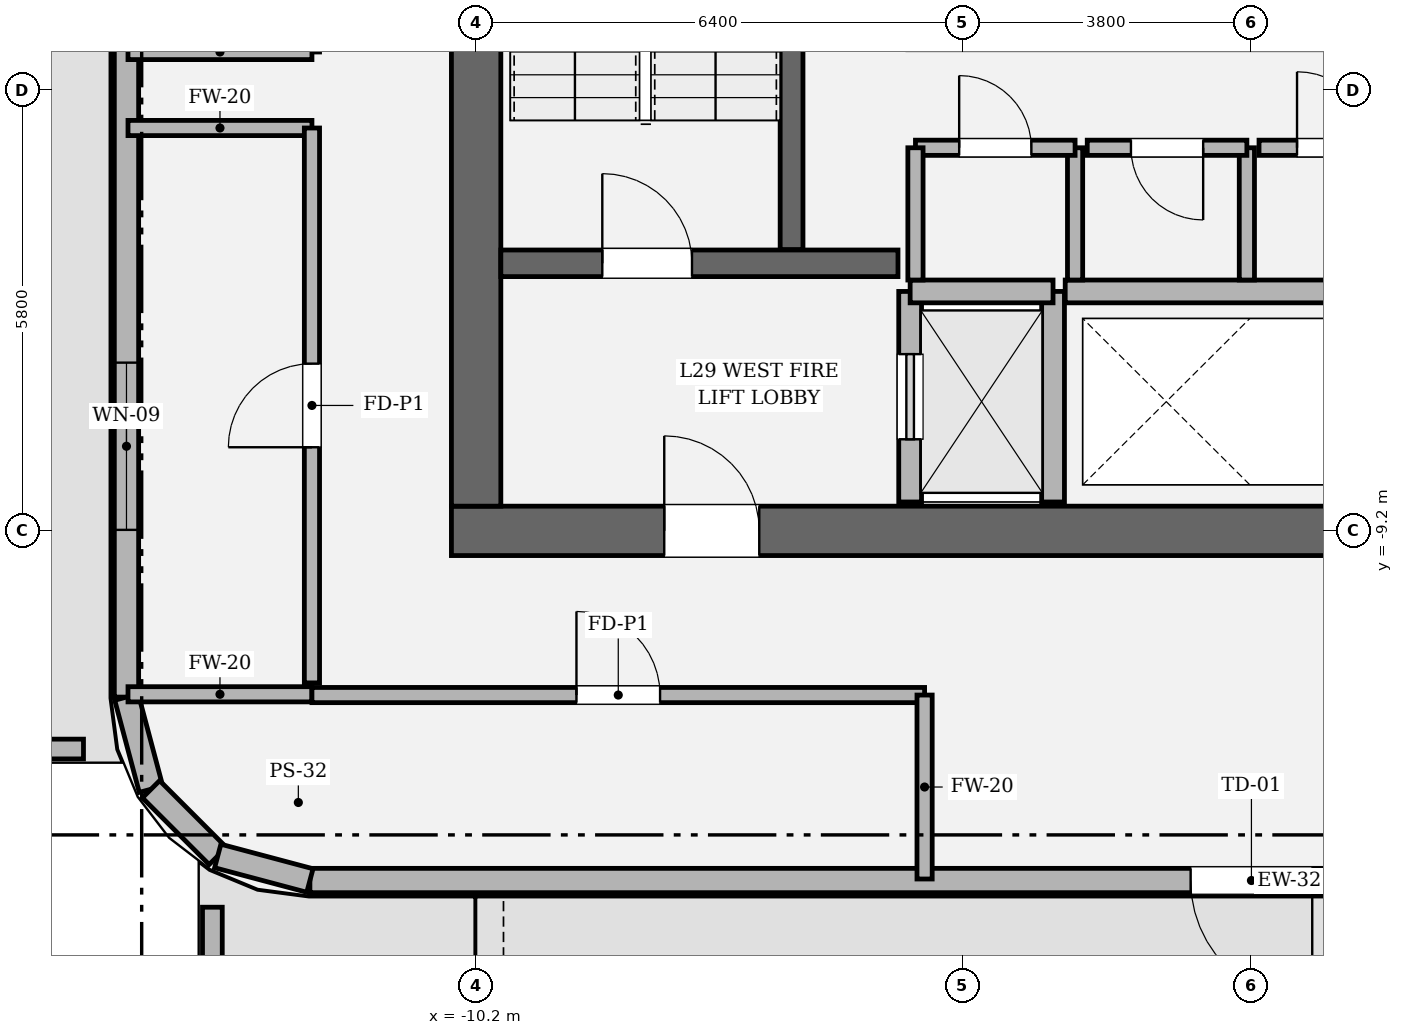
"""IFC4 building model, lengths in metres.
Left out: names, types, materials, properties, quantities, classifications, styles, units other than length and angle.
Written with IfcOpenShell. Run it as: python <this file> out.ifc"""

import sys

from ifc_helpers import new_model, si_unit, direction, frame, frame_2d, origin, place, context, subcontext, project, spatial, rectangle, extrude, element, fill, save


model = new_model("IFC4")
c1 = context("Model", 3, precision=1e-05, world=origin(), true_north=direction((0.0, 1.0)))
c2 = subcontext(c1, "Body", "Model", "MODEL_VIEW")
j1 = project(units=[si_unit("LENGTHUNIT", "METRE"), si_unit("PLANEANGLEUNIT", "RADIAN")], contexts=[c1])
p1 = place(None, origin())
s1 = spatial("IfcSite", under=j1, at=p1, CompositionType="ELEMENT")
p2 = place(p1, origin())
s2 = spatial("IfcBuilding", under=s1, at=p2, CompositionType="ELEMENT")
p3 = place(p2, frame((0.0, 0.0, 125.4)))
s3 = spatial("IfcBuildingStorey", under=s2, at=p3, CompositionType="ELEMENT", Elevation=125.4)
p4 = place(p3, frame((10.525, -9.2, 0.0), z_axis=(0.0, 0.0, 1.0), x_axis=(-1.0, 0.0, 0.0)))
e1 = element("IfcWall", 1, at=p4, inside=s3, PredefinedType="SHEAR", context=c2, shape_type="SweptSolid", body=[
    extrude(rectangle(XDim=21.05, YDim=0.65, at=frame_2d((10.525, 0.0))), origin(), (0.0, 0.0, 1.0), 4.8),
])
p5 = place(p4, frame((2.8, 0.0, 0.0)))
e2 = element("IfcOpeningElement", 2, at=p5, cuts=e1, PredefinedType="OPENING", context=c2, shape_type="SweptSolid", body=[
    extrude(rectangle(XDim=1.25, YDim=2.25, at=frame_2d((0.625, 1.125))), frame((0.0, 0.335, 0.0), z_axis=(0.0, -1.0, 0.0), x_axis=(1.0, 0.0, 0.0)), (0.0, 0.0, 1.0), 0.67),
])
p6 = place(p4, frame((17.0, 0.0, 0.0)))
e3 = element("IfcOpeningElement", 3, at=p6, cuts=e1, PredefinedType="OPENING", context=c2, shape_type="SweptSolid", body=[
    extrude(rectangle(XDim=1.25, YDim=2.25, at=frame_2d((0.625, 1.125))), frame((0.0, 0.335, 0.0), z_axis=(0.0, -1.0, 0.0), x_axis=(1.0, 0.0, 0.0)), (0.0, 0.0, 1.0), 0.67),
])
p7 = place(p3, frame((-10.2, -8.875, 0.0), z_axis=(0.0, 0.0, 1.0), x_axis=(0.0, 1.0, 0.0)))
e4 = element("IfcWall", 4, at=p7, inside=s3, PredefinedType="SHEAR", context=c2, shape_type="SweptSolid", body=[
    extrude(rectangle(XDim=17.75, YDim=0.65, at=frame_2d((8.875, 0.0))), origin(), (0.0, 0.0, 1.0), 4.8),
])
p8 = place(p7, frame((12.665, 0.0, 0.0)))
e5 = element("IfcOpeningElement", 5, at=p8, cuts=e4, PredefinedType="OPENING", context=c2, shape_type="SweptSolid", body=[
    extrude(rectangle(XDim=1.18, YDim=2.2, at=frame_2d((0.59, 1.1))), frame((0.0, 0.335, 0.0), z_axis=(0.0, -1.0, 0.0), x_axis=(1.0, 0.0, 0.0)), (0.0, 0.0, 1.0), 0.67),
])
p9 = place(p3, frame((-6.05, -5.5, 0.0), z_axis=(0.0, 0.0, 1.0), x_axis=(0.0, 1.0, 0.0)))
e6 = element("IfcWall", 6, at=p9, inside=s3, PredefinedType="SOLIDWALL", context=c2, shape_type="SweptSolid", body=[
    extrude(rectangle(XDim=8.95, YDim=0.3, at=frame_2d((4.475, 0.0))), origin(), (0.0, 0.0, 1.0), 4.8),
])
p10 = place(p3, frame((-9.875, -5.68, 0.0), z_axis=(0.0, 0.0, 1.0), x_axis=(1.0, 0.0, 0.0)))
e7 = element("IfcWall", 7, at=p10, inside=s3, PredefinedType="SOLIDWALL", context=c2, shape_type="SweptSolid", body=[
    extrude(rectangle(XDim=5.225, YDim=0.35, at=frame_2d((2.613, 0.0))), origin(), (0.0, 0.0, 1.0), 4.8),
])
p11 = place(p10, frame((1.335, 0.0, 0.0)))
e8 = element("IfcOpeningElement", 8, at=p11, cuts=e7, PredefinedType="OPENING", context=c2, shape_type="SweptSolid", body=[
    extrude(rectangle(XDim=1.18, YDim=2.2, at=frame_2d((0.59, 1.1))), frame((0.0, 0.185, 0.0), z_axis=(0.0, -1.0, 0.0), x_axis=(1.0, 0.0, 0.0)), (0.0, 0.0, 1.0), 0.37),
])
p12 = place(p3, frame((-12.387, -13.8, 0.0), z_axis=(0.0, 0.0, 1.0), x_axis=(1.0, 0.0, 0.0)))
e9 = element("IfcWall", 9, at=p12, inside=s3, PredefinedType="SOLIDWALL", context=c2, shape_type="SweptSolid", body=[
    extrude(rectangle(XDim=24.774, YDim=0.32, at=frame_2d((12.387, 0.0))), origin(), (0.0, 0.0, 1.0), 3.194),
])
p13 = place(p12, frame((11.587, 0.0, 0.0)))
e10 = element("IfcOpeningElement", 10, at=p13, cuts=e9, PredefinedType="OPENING", context=c2, shape_type="SweptSolid", body=[
    extrude(rectangle(XDim=1.6, YDim=2.35, at=frame_2d((0.8, 1.175))), frame((0.0, 0.17, 0.0), z_axis=(0.0, -1.0, 0.0), x_axis=(1.0, 0.0, 0.0)), (0.0, 0.0, 1.0), 0.34),
])
p14 = place(p3, frame((-14.8, 11.387, 0.0), z_axis=(0.0, 0.0, 1.0), x_axis=(0.0, -1.0, 0.0)))
e11 = element("IfcWall", 11, at=p14, inside=s3, PredefinedType="SOLIDWALL", context=c2, shape_type="SweptSolid", body=[
    extrude(rectangle(XDim=22.774, YDim=0.32, at=frame_2d((11.387, 0.0))), origin(), (0.0, 0.0, 1.0), 3.194),
])
p15 = place(p14, frame((2.2, 0.0, 0.9)))
e12 = element("IfcOpeningElement", 12, at=p15, cuts=e11, PredefinedType="OPENING", context=c2, shape_type="SweptSolid", body=[
    extrude(rectangle(XDim=2.2, YDim=1.2, at=frame_2d((1.1, 0.6))), frame((0.0, 0.17, 0.0), z_axis=(0.0, -1.0, 0.0), x_axis=(1.0, 0.0, 0.0)), (0.0, 0.0, 1.0), 0.34),
])
p16 = place(p14, frame((18.374, 0.0, 0.9)))
e13 = element("IfcOpeningElement", 13, at=p16, cuts=e11, PredefinedType="OPENING", context=c2, shape_type="SweptSolid", body=[
    extrude(rectangle(XDim=2.2, YDim=1.2, at=frame_2d((1.1, 0.6))), frame((0.0, 0.17, 0.0), z_axis=(0.0, -1.0, 0.0), x_axis=(1.0, 0.0, 0.0)), (0.0, 0.0, 1.0), 0.34),
])
p17 = place(p3, frame((-14.8, -11.387, 0.0), z_axis=(0.0, 0.0, 1.0), x_axis=(0.25748094776, -0.966283375382, 0.0)))
e14 = element("IfcWall", 14, at=p17, inside=s3, PredefinedType="SOLIDWALL", context=c2, shape_type="SweptSolid", body=[
    extrude(rectangle(XDim=1.254, YDim=0.32, at=frame_2d((0.627, 0.0))), origin(), (0.0, 0.0, 1.0), 3.194),
])
p18 = place(p3, frame((-14.477, -12.599, 0.0), z_axis=(0.0, 0.0, 1.0), x_axis=(0.707106781187, -0.707106781187, 0.0)))
e15 = element("IfcWall", 15, at=p18, inside=s3, PredefinedType="SOLIDWALL", context=c2, shape_type="SweptSolid", body=[
    extrude(rectangle(XDim=1.242, YDim=0.32, at=frame_2d((0.621, 0.0))), origin(), (0.0, 0.0, 1.0), 3.194),
])
p19 = place(p3, frame((-13.599, -13.477, 0.0), z_axis=(0.0, 0.0, 1.0), x_axis=(0.966283375382, -0.25748094776, 0.0)))
e16 = element("IfcWall", 16, at=p19, inside=s3, PredefinedType="SOLIDWALL", context=c2, shape_type="SweptSolid", body=[
    extrude(rectangle(XDim=1.254, YDim=0.32, at=frame_2d((0.627, 0.0))), origin(), (0.0, 0.0, 1.0), 3.194),
])
p20 = place(p3, frame((-20.07, -12.07, 0.0), z_axis=(0.0, 0.0, 1.0), x_axis=(1.0, 0.0, 0.0)))
e17 = element("IfcWall", 17, at=p20, inside=s3, PredefinedType="PARAPET", context=c2, shape_type="SweptSolid", body=[
    extrude(rectangle(XDim=4.704, YDim=0.26, at=frame_2d((2.352, 0.0))), origin(), (0.0, 0.0, 1.0), 1.2),
])
p21 = place(p3, frame((-13.67, -14.151, 0.0), z_axis=(0.0, 0.0, 1.0), x_axis=(0.0, -1.0, 0.0)))
e18 = element("IfcWall", 18, at=p21, inside=s3, PredefinedType="PARAPET", context=c2, shape_type="SweptSolid", body=[
    extrude(rectangle(XDim=4.319, YDim=0.26, at=frame_2d((2.159, 0.0))), origin(), (0.0, 0.0, 1.0), 1.2),
])
p22 = place(p3, frame((-4.49, -8.82, 0.0), z_axis=(0.0, 0.0, 1.0), x_axis=(0.0, 1.0, 0.0)))
e19 = element("IfcWall", 19, at=p22, inside=s3, PredefinedType="SOLIDWALL", context=c2, shape_type="SweptSolid", body=[
    extrude(rectangle(XDim=2.77, YDim=0.3, at=frame_2d((1.385, 0.0))), origin(), (0.0, 0.0, 1.0), 4.48),
])
p23 = place(p22, frame((0.825, 0.0, 0.0)))
e20 = element("IfcOpeningElement", 20, at=p23, cuts=e19, PredefinedType="OPENING", context=c2, shape_type="SweptSolid", body=[
    extrude(rectangle(XDim=1.12, YDim=2.25, at=frame_2d((0.56, 1.125))), frame((0.0, 0.16, 0.0), z_axis=(0.0, -1.0, 0.0), x_axis=(1.0, 0.0, 0.0)), (0.0, 0.0, 1.0), 0.32),
])
p24 = place(p3, frame((-2.61, -8.82, 0.0), z_axis=(0.0, 0.0, 1.0), x_axis=(0.0, 1.0, 0.0)))
e21 = element("IfcWall", 21, at=p24, inside=s3, PredefinedType="SOLIDWALL", context=c2, shape_type="SweptSolid", body=[
    extrude(rectangle(XDim=2.77, YDim=0.3, at=frame_2d((1.385, 0.0))), origin(), (0.0, 0.0, 1.0), 4.48),
])
p25 = place(p3, frame((-4.49, -6.05, 0.0), z_axis=(0.0, 0.0, 1.0), x_axis=(1.0, 0.0, 0.0)))
e22 = element("IfcWall", 22, at=p25, inside=s3, PredefinedType="SOLIDWALL", context=c2, shape_type="SweptSolid", body=[
    extrude(rectangle(XDim=1.88, YDim=0.3, at=frame_2d((0.94, 0.0))), origin(), (0.0, 0.0, 1.0), 4.48),
])
p26 = place(p3, frame((-2.45, -6.05, 0.0), z_axis=(0.0, 0.0, 1.0), x_axis=(1.0, 0.0, 0.0)))
e23 = element("IfcWall", 23, at=p26, inside=s3, PredefinedType="SOLIDWALL", context=c2, shape_type="SweptSolid", body=[
    extrude(rectangle(XDim=4.9, YDim=0.3, at=frame_2d((2.45, 0.0))), origin(), (0.0, 0.0, 1.0), 4.48),
])
p27 = place(p3, frame((-2.32, -5.9, 0.0), z_axis=(0.0, 0.0, 1.0), x_axis=(0.0, 1.0, 0.0)))
e24 = element("IfcWall", 24, at=p27, inside=s3, PredefinedType="SOLIDWALL", context=c2, shape_type="SweptSolid", body=[
    extrude(rectangle(XDim=1.74, YDim=0.2, at=frame_2d((0.87, 0.0))), origin(), (0.0, 0.0, 1.0), 4.48),
])
p28 = place(p3, frame((-2.32, -4.16, 0.0), z_axis=(0.0, 0.0, 1.0), x_axis=(-1.0, 0.0, 0.0)))
e25 = element("IfcWall", 25, at=p28, inside=s3, PredefinedType="SOLIDWALL", context=c2, shape_type="SweptSolid", body=[
    extrude(rectangle(XDim=2.1, YDim=0.2, at=frame_2d((1.05, 0.0))), origin(), (0.0, 0.0, 1.0), 4.48),
])
p29 = place(p28, frame((0.575, 0.0, 0.0)))
e26 = element("IfcOpeningElement", 26, at=p29, cuts=e25, PredefinedType="OPENING", context=c2, shape_type="SweptSolid", body=[
    extrude(rectangle(XDim=0.95, YDim=2.15, at=frame_2d((0.475, 1.075))), frame((0.0, 0.11, 0.0), z_axis=(0.0, -1.0, 0.0), x_axis=(1.0, 0.0, 0.0)), (0.0, 0.0, 1.0), 0.22),
])
for number, where, z_axis, x_axis in (
    (27, (-4.42, -4.16, 0.0), (0.0, 0.0, 1.0), (0.0, -1.0, 0.0)),
    (28, (-0.06, -5.9, 0.0), (0.0, 0.0, 1.0), (0.0, 1.0, 0.0)),
):
    element("IfcWall", number, at=place(p3, frame(where, z_axis=z_axis, x_axis=x_axis)), inside=s3, PredefinedType="SOLIDWALL", context=c2, shape_type="SweptSolid", body=[
        extrude(rectangle(XDim=1.74, YDim=0.2, at=frame_2d((0.87, 0.0))), origin(), (0.0, 0.0, 1.0), 4.48),
    ])
p30 = place(p3, frame((-0.06, -4.16, 0.0), z_axis=(0.0, 0.0, 1.0), x_axis=(-1.0, 0.0, 0.0)))
e29 = element("IfcWall", 29, at=p30, inside=s3, PredefinedType="SOLIDWALL", context=c2, shape_type="SweptSolid", body=[
    extrude(rectangle(XDim=2.1, YDim=0.2, at=frame_2d((1.05, 0.0))), origin(), (0.0, 0.0, 1.0), 4.48),
])
p31 = place(p30, frame((0.575, 0.0, 0.0)))
e30 = element("IfcOpeningElement", 30, at=p31, cuts=e29, PredefinedType="OPENING", context=c2, shape_type="SweptSolid", body=[
    extrude(rectangle(XDim=0.95, YDim=2.15, at=frame_2d((0.475, 1.075))), frame((0.0, 0.11, 0.0), z_axis=(0.0, -1.0, 0.0), x_axis=(1.0, 0.0, 0.0)), (0.0, 0.0, 1.0), 0.22),
])
p32 = place(p3, frame((2.1, -4.16, 0.0), z_axis=(0.0, 0.0, 1.0), x_axis=(-1.0, 0.0, 0.0)))
e31 = element("IfcWall", 31, at=p32, inside=s3, PredefinedType="SOLIDWALL", context=c2, shape_type="SweptSolid", body=[
    extrude(rectangle(XDim=2.0, YDim=0.2, at=frame_2d((1.0, 0.0))), origin(), (0.0, 0.0, 1.0), 4.48),
])
p33 = place(p32, frame((0.5, 0.0, 0.0)))
e32 = element("IfcOpeningElement", 32, at=p33, cuts=e31, PredefinedType="OPENING", context=c2, shape_type="SweptSolid", body=[
    extrude(rectangle(XDim=1.0, YDim=2.15, at=frame_2d((0.5, 1.075))), frame((0.0, 0.11, 0.0), z_axis=(0.0, -1.0, 0.0), x_axis=(1.0, 0.0, 0.0)), (0.0, 0.0, 1.0), 0.22),
])
p34 = place(p3, frame((-14.78, -11.35, 0.0), z_axis=(0.0, 0.0, 1.0), x_axis=(1.0, 0.0, 0.0)))
e33 = element("IfcWall", 33, at=p34, inside=s3, PredefinedType="SOLIDWALL", context=c2, shape_type="SweptSolid", body=[
    extrude(rectangle(XDim=2.42, YDim=0.2, at=frame_2d((1.21, 0.0))), origin(), (0.0, 0.0, 1.0), 3.194),
])
p35 = place(p3, frame((-12.36, -11.36, 0.0), z_axis=(0.0, 0.0, 1.0), x_axis=(1.0, 0.0, 0.0)))
e34 = element("IfcWall", 34, at=p35, inside=s3, PredefinedType="SOLIDWALL", context=c2, shape_type="SweptSolid", body=[
    extrude(rectangle(XDim=8.06, YDim=0.2, at=frame_2d((4.03, 0.0))), origin(), (0.0, 0.0, 1.0), 4.48),
])
p36 = place(p35, frame((3.48, 0.0, 0.0)))
e35 = element("IfcOpeningElement", 35, at=p36, cuts=e34, PredefinedType="OPENING", context=c2, shape_type="SweptSolid", body=[
    extrude(rectangle(XDim=1.1, YDim=2.2, at=frame_2d((0.55, 1.1))), frame((0.0, 0.11, 0.0), z_axis=(0.0, -1.0, 0.0), x_axis=(1.0, 0.0, 0.0)), (0.0, 0.0, 1.0), 0.22),
])
for number, where, z_axis, x_axis in (
    (36, (-4.3, -11.36, 0.0), (0.0, 0.0, 1.0), (0.0, -1.0, 0.0)),
    (37, (-14.78, -3.9, 0.0), (0.0, 0.0, 1.0), (1.0, 0.0, 0.0)),
):
    element("IfcWall", number, at=place(p3, frame(where, z_axis=z_axis, x_axis=x_axis)), inside=s3, PredefinedType="SOLIDWALL", context=c2, shape_type="SweptSolid", body=[
        extrude(rectangle(XDim=2.42, YDim=0.2, at=frame_2d((1.21, 0.0))), origin(), (0.0, 0.0, 1.0), 3.194),
    ])
p37 = place(p3, frame((-12.36, -3.9, 0.0), z_axis=(0.0, 0.0, 1.0), x_axis=(0.0, -1.0, 0.0)))
e38 = element("IfcWall", 38, at=p37, inside=s3, PredefinedType="SOLIDWALL", context=c2, shape_type="SweptSolid", body=[
    extrude(rectangle(XDim=7.3, YDim=0.2, at=frame_2d((3.65, 0.0))), origin(), (0.0, 0.0, 1.0), 4.48),
])
p38 = place(p37, frame((3.1, 0.0, 0.0)))
e39 = element("IfcOpeningElement", 39, at=p38, cuts=e38, PredefinedType="OPENING", context=c2, shape_type="SweptSolid", body=[
    extrude(rectangle(XDim=1.1, YDim=2.2, at=frame_2d((0.55, 1.1))), frame((0.0, 0.11, 0.0), z_axis=(0.0, -1.0, 0.0), x_axis=(1.0, 0.0, 0.0)), (0.0, 0.0, 1.0), 0.22),
])
p39 = place(p3, frame((-12.36, -2.9, 0.0), z_axis=(0.0, 0.0, 1.0), x_axis=(-1.0, 0.0, 0.0)))
e40 = element("IfcWall", 40, at=p39, inside=s3, PredefinedType="SOLIDWALL", context=c2, shape_type="SweptSolid", body=[
    extrude(rectangle(XDim=2.42, YDim=0.2, at=frame_2d((1.21, 0.0))), origin(), (0.0, 0.0, 1.0), 3.194),
])
p40 = place(p13, origin())
e41 = element("IfcDoor", 41, at=p40, inside=s3, OperationType="SINGLE_SWING_RIGHT", PredefinedType="DOOR", context=c2, shape_type="SweptSolid", body=[
    extrude(rectangle(XDim=1.6, YDim=2.35, at=frame_2d((0.8, 1.175))), frame((0.0, 0.025, 0.0), z_axis=(0.0, -1.0, 0.0), x_axis=(1.0, 0.0, 0.0)), (0.0, 0.0, 1.0), 0.05),
])
fill(e10, e41)
p41 = place(p16, origin())
e42 = element("IfcWindow", 42, at=p41, inside=s3, PartitioningType="SINGLE_PANEL", PredefinedType="WINDOW", context=c2, shape_type="SweptSolid", body=[
    extrude(rectangle(XDim=2.2, YDim=1.2, at=frame_2d((1.1, 0.6))), frame((0.0, 0.03, 0.0), z_axis=(0.0, -1.0, 0.0), x_axis=(1.0, 0.0, 0.0)), (0.0, 0.0, 1.0), 0.06),
])
fill(e13, e42)
p42 = place(p11, origin())
e43 = element("IfcDoor", 43, at=p42, inside=s3, OperationType="SINGLE_SWING_LEFT", PredefinedType="DOOR", context=c2, shape_type="SweptSolid", body=[
    extrude(rectangle(XDim=1.18, YDim=2.2, at=frame_2d((0.59, 1.1))), frame((0.0, 0.025, 0.0), z_axis=(0.0, -1.0, 0.0), x_axis=(1.0, 0.0, 0.0)), (0.0, 0.0, 1.0), 0.05),
])
fill(e8, e43)
p43 = place(p6, origin())
e44 = element("IfcDoor", 44, at=p43, inside=s3, OperationType="SINGLE_SWING_RIGHT", PredefinedType="DOOR", context=c2, shape_type="SweptSolid", body=[
    extrude(rectangle(XDim=1.25, YDim=2.25, at=frame_2d((0.625, 1.125))), frame((0.0, 0.025, 0.0), z_axis=(0.0, -1.0, 0.0), x_axis=(1.0, 0.0, 0.0)), (0.0, 0.0, 1.0), 0.05),
])
fill(e3, e44)
p44 = place(p23, origin())
e45 = element("IfcDoor", 45, at=p44, inside=s3, OperationType="SLIDING_TO_LEFT", PredefinedType="DOOR", context=c2, shape_type="SweptSolid", body=[
    extrude(rectangle(XDim=1.12, YDim=2.25, at=frame_2d((0.56, 1.125))), frame((0.0, 0.025, 0.0), z_axis=(0.0, -1.0, 0.0), x_axis=(1.0, 0.0, 0.0)), (0.0, 0.0, 1.0), 0.05),
])
fill(e20, e45)
p45 = place(p29, origin())
e46 = element("IfcDoor", 46, at=p45, inside=s3, OperationType="SINGLE_SWING_RIGHT", PredefinedType="DOOR", context=c2, shape_type="SweptSolid", body=[
    extrude(rectangle(XDim=0.95, YDim=2.15, at=frame_2d((0.475, 1.075))), frame((0.0, 0.025, 0.0), z_axis=(0.0, -1.0, 0.0), x_axis=(1.0, 0.0, 0.0)), (0.0, 0.0, 1.0), 0.05),
])
fill(e26, e46)
p46 = place(p31, origin())
e47 = element("IfcDoor", 47, at=p46, inside=s3, OperationType="SINGLE_SWING_LEFT", PredefinedType="DOOR", context=c2, shape_type="SweptSolid", body=[
    extrude(rectangle(XDim=0.95, YDim=2.15, at=frame_2d((0.475, 1.075))), frame((0.0, 0.025, 0.0), z_axis=(0.0, -1.0, 0.0), x_axis=(1.0, 0.0, 0.0)), (0.0, 0.0, 1.0), 0.05),
])
fill(e30, e47)
p47 = place(p33, origin())
e48 = element("IfcDoor", 48, at=p47, inside=s3, OperationType="SINGLE_SWING_RIGHT", PredefinedType="DOOR", context=c2, shape_type="SweptSolid", body=[
    extrude(rectangle(XDim=1.0, YDim=2.15, at=frame_2d((0.5, 1.075))), frame((0.0, 0.025, 0.0), z_axis=(0.0, -1.0, 0.0), x_axis=(1.0, 0.0, 0.0)), (0.0, 0.0, 1.0), 0.05),
])
fill(e32, e48)
p48 = place(p36, origin())
e49 = element("IfcDoor", 49, at=p48, inside=s3, OperationType="SINGLE_SWING_LEFT", PredefinedType="DOOR", context=c2, shape_type="SweptSolid", body=[
    extrude(rectangle(XDim=1.1, YDim=2.2, at=frame_2d((0.55, 1.1))), frame((0.0, 0.025, 0.0), z_axis=(0.0, -1.0, 0.0), x_axis=(1.0, 0.0, 0.0)), (0.0, 0.0, 1.0), 0.05),
])
fill(e35, e49)
p49 = place(p38, origin())
e50 = element("IfcDoor", 50, at=p49, inside=s3, OperationType="SINGLE_SWING_RIGHT", PredefinedType="DOOR", context=c2, shape_type="SweptSolid", body=[
    extrude(rectangle(XDim=1.1, YDim=2.2, at=frame_2d((0.55, 1.1))), frame((0.0, 0.025, 0.0), z_axis=(0.0, -1.0, 0.0), x_axis=(1.0, 0.0, 0.0)), (0.0, 0.0, 1.0), 0.05),
])
fill(e39, e50)
save(model, sys.argv[1])
